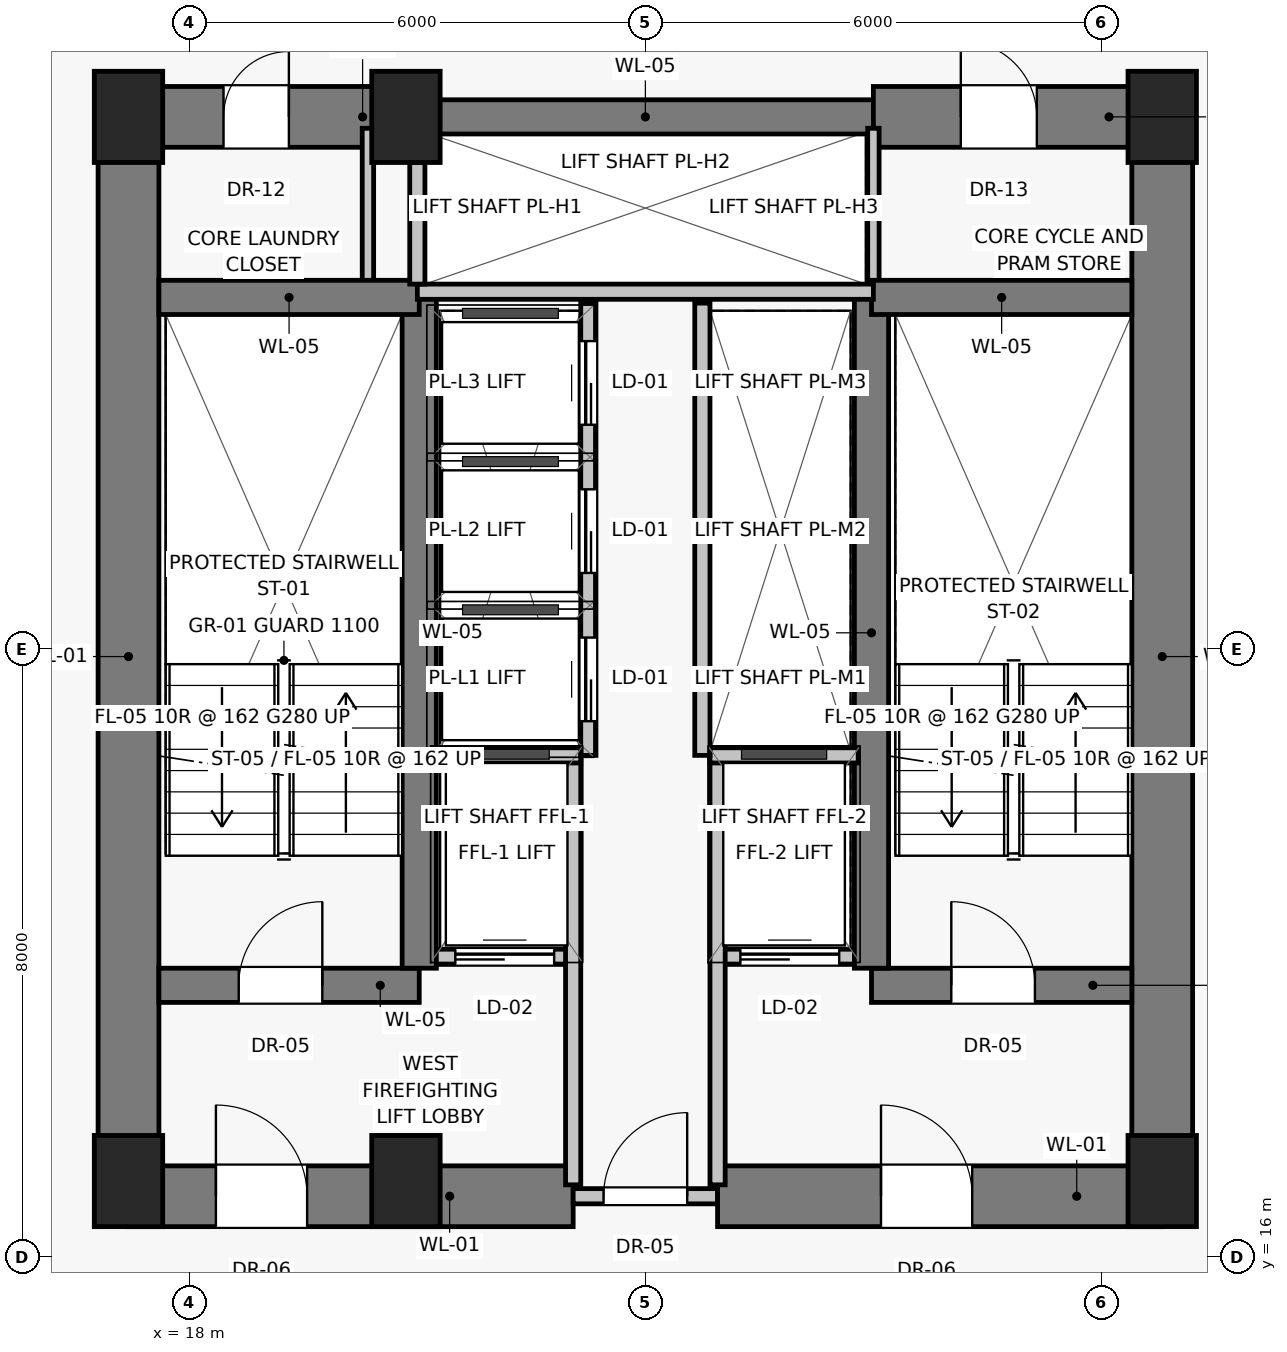
"""IFC4 building model, lengths in metres.
Left out: names, types, materials, properties, quantities, classifications, styles, units other than length and angle.
Written with IfcOpenShell. Run it as: python <this file> out.ifc"""

import sys

from ifc_helpers import new_model, si_unit, direction, frame, frame_2d, origin, origin_2d, place, context, subcontext, project, spatial, rectangle, extrude, source, transform, mapped, element, fill, save


model = new_model("IFC4")
c1 = context("Model", 3, precision=1e-05, world=origin(), true_north=direction((0.0, 1.0)))
c2 = subcontext(c1, "Body", "Model", "MODEL_VIEW")
j1 = project(units=[si_unit("LENGTHUNIT", "METRE"), si_unit("PLANEANGLEUNIT", "RADIAN")], contexts=[c1])
p1 = place(None, origin())
s1 = spatial("IfcSite", under=j1, at=p1, CompositionType="ELEMENT")
p2 = place(p1, origin())
s2 = spatial("IfcBuilding", under=s1, at=p2, CompositionType="ELEMENT")
p3 = place(p2, frame((0.0, 0.0, 73.85)))
s3 = spatial("IfcBuildingStorey", under=s2, at=p3, CompositionType="ELEMENT", Elevation=73.85)
for number, where, z_axis, x_axis in (
    (1, (17.2, 17.0, 0.0), (0.0, 0.0, 1.0), (1.0, 0.0, 0.0)),
    (2, (20.85, 17.0, 0.0), (0.0, 0.0, 1.0), (1.0, 0.0, 0.0)),
    (3, (30.8, 17.0, 0.0), (0.0, 0.0, 1.0), (1.0, 0.0, 0.0)),
    (4, (17.2, 31.0, 0.0), (0.0, 0.0, 1.0), (1.0, 0.0, 0.0)),
    (5, (20.85, 31.0, 0.0), (0.0, 0.0, 1.0), (1.0, 0.0, 0.0)),
    (6, (30.8, 31.0, 0.0), (0.0, 0.0, 1.0), (1.0, 0.0, 0.0)),
):
    element("IfcColumn", number, at=place(p3, frame(where, z_axis=z_axis, x_axis=x_axis)), inside=s3, PredefinedType="PILASTER", context=c2, shape_type="SweptSolid", body=[
        extrude(rectangle(XDim=0.9, YDim=1.2, at=origin_2d()), origin(), (0.0, 0.0, 1.0), 3.25),
    ])
for number, where, z_axis, x_axis in (
    (7, (17.2, 16.8, 0.0), (0.0, 0.0, 1.0), (0.0, 1.0, 0.0)),
    (8, (30.8, 16.8, 0.0), (0.0, 0.0, 1.0), (0.0, 1.0, 0.0)),
):
    element("IfcWall", number, at=place(p3, frame(where, z_axis=z_axis, x_axis=x_axis)), inside=s3, PredefinedType="SHEAR", context=c2, shape_type="SweptSolid", body=[
        extrude(rectangle(XDim=14.2, YDim=0.8, at=frame_2d((7.1, 0.0))), origin(), (0.0, 0.0, 1.0), 3.0),
    ])
p4 = place(p3, frame((17.2, 16.8, 0.0), z_axis=(0.0, 0.0, 1.0), x_axis=(1.0, 0.0, 0.0)))
e9 = element("IfcWall", 9, at=p4, inside=s3, PredefinedType="SHEAR", context=c2, shape_type="SweptSolid", body=[
    extrude(rectangle(XDim=5.85, YDim=0.8, at=frame_2d((2.925, 0.0))), origin(), (0.0, 0.0, 1.0), 3.0),
])
p5 = place(p4, frame((1.15, 0.0, 0.0)))
e10 = element("IfcOpeningElement", 10, at=p5, cuts=e9, PredefinedType="OPENING", context=c2, shape_type="SweptSolid", body=[
    extrude(rectangle(XDim=1.2, YDim=2.03, at=frame_2d((0.6, 1.015))), frame((0.0, 0.41, 0.0), z_axis=(0.0, -1.0, 0.0), x_axis=(1.0, 0.0, 0.0)), (0.0, 0.0, 1.0), 0.82),
])
p6 = place(p3, frame((23.05, 16.8, 0.0), z_axis=(0.0, 0.0, 1.0), x_axis=(1.0, 0.0, 0.0)))
e11 = element("IfcWall", 11, at=p6, inside=s3, PredefinedType="SOLIDWALL", context=c2, shape_type="SweptSolid", body=[
    extrude(rectangle(XDim=1.9, YDim=0.2, at=frame_2d((0.95, 0.0))), origin(), (0.0, 0.0, 1.0), 2.15),
])
p7 = place(p6, frame((0.4, 0.0, 0.0)))
e12 = element("IfcOpeningElement", 12, at=p7, cuts=e11, PredefinedType="OPENING", context=c2, shape_type="SweptSolid", body=[
    extrude(rectangle(XDim=1.1, YDim=2.03, at=frame_2d((0.55, 1.015))), frame((0.0, 0.11, 0.0), z_axis=(0.0, -1.0, 0.0), x_axis=(1.0, 0.0, 0.0)), (0.0, 0.0, 1.0), 0.22),
])
p8 = place(p3, frame((24.95, 16.8, 0.0), z_axis=(0.0, 0.0, 1.0), x_axis=(1.0, 0.0, 0.0)))
e13 = element("IfcWall", 13, at=p8, inside=s3, PredefinedType="SHEAR", context=c2, shape_type="SweptSolid", body=[
    extrude(rectangle(XDim=5.85, YDim=0.8, at=frame_2d((2.925, 0.0))), origin(), (0.0, 0.0, 1.0), 3.0),
])
p9 = place(p8, frame((2.15, 0.0, 0.0)))
e14 = element("IfcOpeningElement", 14, at=p9, cuts=e13, PredefinedType="OPENING", context=c2, shape_type="SweptSolid", body=[
    extrude(rectangle(XDim=1.2, YDim=2.03, at=frame_2d((0.6, 1.015))), frame((0.0, 0.41, 0.0), z_axis=(0.0, -1.0, 0.0), x_axis=(1.0, 0.0, 0.0)), (0.0, 0.0, 1.0), 0.82),
])
p10 = place(p3, frame((17.2, 31.0, 0.0), z_axis=(0.0, 0.0, 1.0), x_axis=(1.0, 0.0, 0.0)))
e15 = element("IfcWall", 15, at=p10, inside=s3, PredefinedType="SHEAR", context=c2, shape_type="SweptSolid", body=[
    extrude(rectangle(XDim=3.8, YDim=0.8, at=frame_2d((1.9, 0.0))), origin(), (0.0, 0.0, 1.0), 3.0),
])
p11 = place(p10, frame((1.25, 0.0, 0.0)))
e16 = element("IfcOpeningElement", 16, at=p11, cuts=e15, PredefinedType="OPENING", context=c2, shape_type="SweptSolid", body=[
    extrude(rectangle(XDim=0.86, YDim=2.01, at=frame_2d((0.43, 1.005))), frame((0.0, 0.41, 0.0), z_axis=(0.0, -1.0, 0.0), x_axis=(1.0, 0.0, 0.0)), (0.0, 0.0, 1.0), 0.82),
])
p12 = place(p3, frame((21.0, 31.0, 0.0), z_axis=(0.0, 0.0, 1.0), x_axis=(1.0, 0.0, 0.0)))
e17 = element("IfcWall", 17, at=p12, inside=s3, PredefinedType="SHEAR", context=c2, shape_type="SweptSolid", body=[
    extrude(rectangle(XDim=6.0, YDim=0.45, at=frame_2d((3.0, 0.0))), origin(), (0.0, 0.0, 1.0), 3.0),
])
p13 = place(p3, frame((27.0, 31.0, 0.0), z_axis=(0.0, 0.0, 1.0), x_axis=(1.0, 0.0, 0.0)))
e18 = element("IfcWall", 18, at=p13, inside=s3, PredefinedType="SHEAR", context=c2, shape_type="SweptSolid", body=[
    extrude(rectangle(XDim=3.8, YDim=0.8, at=frame_2d((1.9, 0.0))), origin(), (0.0, 0.0, 1.0), 3.0),
])
p14 = place(p13, frame((1.15, 0.0, 0.0)))
e19 = element("IfcOpeningElement", 19, at=p14, cuts=e18, PredefinedType="OPENING", context=c2, shape_type="SweptSolid", body=[
    extrude(rectangle(XDim=1.0, YDim=2.01, at=frame_2d((0.5, 1.005))), frame((0.0, 0.41, 0.0), z_axis=(0.0, -1.0, 0.0), x_axis=(1.0, 0.0, 0.0)), (0.0, 0.0, 1.0), 0.82),
])
for number, where, z_axis, x_axis in (
    (20, (20.35, 28.65, 0.0), (0.0, 0.0, 1.0), (0.0, 1.0, 0.0)),
    (21, (27.0, 28.65, 0.0), (0.0, 0.0, 1.0), (0.0, 1.0, 0.0)),
):
    element("IfcWall", number, at=place(p3, frame(where, z_axis=z_axis, x_axis=x_axis)), inside=s3, PredefinedType="PARTITIONING", context=c2, shape_type="SweptSolid", body=[
        extrude(rectangle(XDim=2.2, YDim=0.15, at=frame_2d((1.1, 0.0))), origin(), (0.0, 0.0, 1.0), 3.0),
    ])
p15 = place(p3, frame((17.6, 19.575, 0.0), z_axis=(0.0, 0.0, 1.0), x_axis=(1.0, 0.0, 0.0)))
e22 = element("IfcWall", 22, at=p15, inside=s3, PredefinedType="SHEAR", context=c2, shape_type="SweptSolid", body=[
    extrude(rectangle(XDim=3.425, YDim=0.45, at=frame_2d((1.712, 0.0))), origin(), (0.0, 0.0, 1.0), 3.0),
])
p16 = place(p15, frame((1.05, 0.0, 0.0)))
e23 = element("IfcOpeningElement", 23, at=p16, cuts=e22, PredefinedType="OPENING", context=c2, shape_type="SweptSolid", body=[
    extrude(rectangle(XDim=1.1, YDim=2.03, at=frame_2d((0.55, 1.015))), frame((0.0, 0.235, 0.0), z_axis=(0.0, -1.0, 0.0), x_axis=(1.0, 0.0, 0.0)), (0.0, 0.0, 1.0), 0.47),
])
p17 = place(p3, frame((21.2, 19.95, 0.0), z_axis=(0.0, 0.0, 1.0), x_axis=(1.0, 0.0, 0.0)))
e24 = element("IfcWall", 24, at=p17, inside=s3, PredefinedType="SOLIDWALL", context=c2, shape_type="SweptSolid", body=[
    extrude(rectangle(XDim=1.85, YDim=0.2, at=frame_2d((0.925, 0.0))), origin(), (0.0, 0.0, 1.0), 3.0),
])
p18 = place(p17, frame((0.3, 0.0, 0.0)))
e25 = element("IfcOpeningElement", 25, at=p18, cuts=e24, PredefinedType="OPENING", context=c2, shape_type="SweptSolid", body=[
    extrude(rectangle(XDim=1.3, YDim=2.25, at=frame_2d((0.65, 1.125))), frame((0.0, 0.11, 0.0), z_axis=(0.0, -1.0, 0.0), x_axis=(1.0, 0.0, 0.0)), (0.0, 0.0, 1.0), 0.22),
])
p19 = place(p3, frame((24.95, 19.95, 0.0), z_axis=(0.0, 0.0, 1.0), x_axis=(1.0, 0.0, 0.0)))
e26 = element("IfcWall", 26, at=p19, inside=s3, PredefinedType="SOLIDWALL", context=c2, shape_type="SweptSolid", body=[
    extrude(rectangle(XDim=1.85, YDim=0.2, at=frame_2d((0.925, 0.0))), origin(), (0.0, 0.0, 1.0), 3.0),
])
p20 = place(p19, frame((0.3, 0.0, 0.0)))
e27 = element("IfcOpeningElement", 27, at=p20, cuts=e26, PredefinedType="OPENING", context=c2, shape_type="SweptSolid", body=[
    extrude(rectangle(XDim=1.3, YDim=2.25, at=frame_2d((0.65, 1.125))), frame((0.0, 0.11, 0.0), z_axis=(0.0, -1.0, 0.0), x_axis=(1.0, 0.0, 0.0)), (0.0, 0.0, 1.0), 0.22),
])
p21 = place(p3, frame((26.975, 19.575, 0.0), z_axis=(0.0, 0.0, 1.0), x_axis=(1.0, 0.0, 0.0)))
e28 = element("IfcWall", 28, at=p21, inside=s3, PredefinedType="SHEAR", context=c2, shape_type="SweptSolid", body=[
    extrude(rectangle(XDim=3.425, YDim=0.45, at=frame_2d((1.712, 0.0))), origin(), (0.0, 0.0, 1.0), 3.0),
])
p22 = place(p21, frame((1.05, 0.0, 0.0)))
e29 = element("IfcOpeningElement", 29, at=p22, cuts=e28, PredefinedType="OPENING", context=c2, shape_type="SweptSolid", body=[
    extrude(rectangle(XDim=1.1, YDim=2.03, at=frame_2d((0.55, 1.015))), frame((0.0, 0.235, 0.0), z_axis=(0.0, -1.0, 0.0), x_axis=(1.0, 0.0, 0.0)), (0.0, 0.0, 1.0), 0.47),
])
for number, where, z_axis, x_axis in (
    (30, (21.025, 19.8, 0.0), (0.0, 0.0, 1.0), (0.0, 1.0, 0.0)),
    (31, (26.975, 19.8, 0.0), (0.0, 0.0, 1.0), (0.0, 1.0, 0.0)),
):
    element("IfcWall", number, at=place(p3, frame(where, z_axis=z_axis, x_axis=x_axis)), inside=s3, PredefinedType="SHEAR", context=c2, shape_type="SweptSolid", body=[
        extrude(rectangle(XDim=8.825, YDim=0.45, at=frame_2d((4.413, 0.0))), origin(), (0.0, 0.0, 1.0), 3.0),
    ])
for number, where, z_axis, x_axis in (
    (32, (17.6, 28.625, 0.0), (0.0, 0.0, 1.0), (1.0, 0.0, 0.0)),
    (33, (26.975, 28.625, 0.0), (0.0, 0.0, 1.0), (1.0, 0.0, 0.0)),
):
    element("IfcWall", number, at=place(p3, frame(where, z_axis=z_axis, x_axis=x_axis)), inside=s3, PredefinedType="SHEAR", context=c2, shape_type="SweptSolid", body=[
        extrude(rectangle(XDim=3.425, YDim=0.45, at=frame_2d((1.712, 0.0))), origin(), (0.0, 0.0, 1.0), 3.0),
    ])
for number, where, z_axis, x_axis in (
    (34, (23.05, 16.95, 0.0), (0.0, 0.0, 1.0), (0.0, 1.0, 0.0)),
    (35, (24.95, 16.95, 0.0), (0.0, 0.0, 1.0), (0.0, 1.0, 0.0)),
):
    element("IfcWall", number, at=place(p3, frame(where, z_axis=z_axis, x_axis=x_axis)), inside=s3, PredefinedType="SOLIDWALL", context=c2, shape_type="SweptSolid", body=[
        extrude(rectangle(XDim=5.6, YDim=0.2, at=frame_2d((2.8, 0.0))), origin(), (0.0, 0.0, 1.0), 3.0),
    ])
for number, where, z_axis, x_axis in (
    (36, (21.2, 22.6, 0.0), (0.0, 0.0, 1.0), (1.0, 0.0, 0.0)),
    (37, (24.85, 22.6, 0.0), (0.0, 0.0, 1.0), (1.0, 0.0, 0.0)),
):
    element("IfcWall", number, at=place(p3, frame(where, z_axis=z_axis, x_axis=x_axis)), inside=s3, PredefinedType="SOLIDWALL", context=c2, shape_type="SweptSolid", body=[
        extrude(rectangle(XDim=1.95, YDim=0.2, at=frame_2d((0.975, 0.0))), origin(), (0.0, 0.0, 1.0), 3.0),
    ])
p23 = place(p3, frame((21.0, 28.7, 0.0), z_axis=(0.0, 0.0, 1.0), x_axis=(1.0, 0.0, 0.0)))
e38 = element("IfcWall", 38, at=p23, inside=s3, PredefinedType="SOLIDWALL", context=c2, shape_type="SweptSolid", body=[
    extrude(rectangle(XDim=6.0, YDim=0.2, at=frame_2d((3.0, 0.0))), origin(), (0.0, 0.0, 1.0), 3.0),
])
p24 = place(p3, frame((21.0, 28.8, 0.0), z_axis=(0.0, 0.0, 1.0), x_axis=(0.0, 1.0, 0.0)))
e39 = element("IfcWall", 39, at=p24, inside=s3, PredefinedType="SOLIDWALL", context=c2, shape_type="SweptSolid", body=[
    extrude(rectangle(XDim=1.6, YDim=0.2, at=frame_2d((0.8, 0.0))), origin(), (0.0, 0.0, 1.0), 3.0),
])
p25 = place(p3, frame((23.25, 22.6, 0.0), z_axis=(0.0, 0.0, 1.0), x_axis=(0.0, 1.0, 0.0)))
e40 = element("IfcWall", 40, at=p25, inside=s3, PredefinedType="SOLIDWALL", context=c2, shape_type="SweptSolid", body=[
    extrude(rectangle(XDim=5.95, YDim=0.2, at=frame_2d((2.975, 0.0))), origin(), (0.0, 0.0, 1.0), 3.0),
])
p26 = place(p25, frame((0.45, 0.0, 0.0)))
e41 = element("IfcOpeningElement", 41, at=p26, cuts=e40, PredefinedType="OPENING", context=c2, shape_type="SweptSolid", body=[
    extrude(rectangle(XDim=1.1, YDim=2.08, at=frame_2d((0.55, 1.04))), frame((0.0, 0.11, 0.0), z_axis=(0.0, -1.0, 0.0), x_axis=(1.0, 0.0, 0.0)), (0.0, 0.0, 1.0), 0.22),
])
p27 = place(p25, frame((2.4, 0.0, 0.0)))
e42 = element("IfcOpeningElement", 42, at=p27, cuts=e40, PredefinedType="OPENING", context=c2, shape_type="SweptSolid", body=[
    extrude(rectangle(XDim=1.1, YDim=2.08, at=frame_2d((0.55, 1.04))), frame((0.0, 0.11, 0.0), z_axis=(0.0, -1.0, 0.0), x_axis=(1.0, 0.0, 0.0)), (0.0, 0.0, 1.0), 0.22),
])
p28 = place(p25, frame((4.35, 0.0, 0.0)))
e43 = element("IfcOpeningElement", 43, at=p28, cuts=e40, PredefinedType="OPENING", context=c2, shape_type="SweptSolid", body=[
    extrude(rectangle(XDim=1.1, YDim=2.08, at=frame_2d((0.55, 1.04))), frame((0.0, 0.11, 0.0), z_axis=(0.0, -1.0, 0.0), x_axis=(1.0, 0.0, 0.0)), (0.0, 0.0, 1.0), 0.22),
])
p29 = place(p3, frame((24.75, 22.6, 0.0), z_axis=(0.0, 0.0, 1.0), x_axis=(0.0, 1.0, 0.0)))
e44 = element("IfcWall", 44, at=p29, inside=s3, PredefinedType="SOLIDWALL", context=c2, shape_type="SweptSolid", body=[
    extrude(rectangle(XDim=5.95, YDim=0.2, at=frame_2d((2.975, 0.0))), origin(), (0.0, 0.0, 1.0), 3.0),
])
m1 = source(origin(), c2, "Body", "SweptSolid", [
    extrude(rectangle(XDim=1.2, YDim=2.03, at=frame_2d((0.6, 1.015))), frame((0.0, 0.025, 0.0), z_axis=(0.0, -1.0, 0.0), x_axis=(1.0, 0.0, 0.0)), (0.0, 0.0, 1.0), 0.05),
])
p30 = place(p5, origin())
e45 = element("IfcDoor", 45, at=p30, inside=s3, OperationType="SINGLE_SWING_LEFT", PredefinedType="DOOR", context=c2, shape_type="MappedRepresentation", body=[
    mapped(m1, transform((0.0, 0.0, 0.0), scale=1.0)),
])
fill(e10, e45)
m2 = source(origin(), c2, "Body", "SweptSolid", [
    extrude(rectangle(XDim=1.1, YDim=2.03, at=frame_2d((0.55, 1.015))), frame((0.0, 0.025, 0.0), z_axis=(0.0, -1.0, 0.0), x_axis=(1.0, 0.0, 0.0)), (0.0, 0.0, 1.0), 0.05),
])
p31 = place(p7, origin())
e46 = element("IfcDoor", 46, at=p31, inside=s3, OperationType="SINGLE_SWING_RIGHT", PredefinedType="DOOR", context=c2, shape_type="MappedRepresentation", body=[
    mapped(m2, transform((0.0, 0.0, 0.0), scale=1.0)),
])
fill(e12, e46)
p32 = place(p9, origin())
e47 = element("IfcDoor", 47, at=p32, inside=s3, OperationType="SINGLE_SWING_LEFT", PredefinedType="DOOR", context=c2, shape_type="MappedRepresentation", body=[
    mapped(m1, transform((0.0, 0.0, 0.0), scale=1.0)),
])
fill(e14, e47)
m3 = source(origin(), c2, "Body", "SweptSolid", [
    extrude(rectangle(XDim=0.86, YDim=2.01, at=frame_2d((0.43, 1.005))), frame((0.0, 0.025, 0.0), z_axis=(0.0, -1.0, 0.0), x_axis=(1.0, 0.0, 0.0)), (0.0, 0.0, 1.0), 0.05),
])
p33 = place(p11, origin())
e48 = element("IfcDoor", 48, at=p33, inside=s3, OperationType="SINGLE_SWING_RIGHT", PredefinedType="DOOR", context=c2, shape_type="MappedRepresentation", body=[
    mapped(m3, transform((0.0, 0.0, 0.0), scale=1.0)),
])
fill(e16, e48)
m4 = source(origin(), c2, "Body", "SweptSolid", [
    extrude(rectangle(XDim=1.0, YDim=2.01, at=frame_2d((0.5, 1.005))), frame((0.0, 0.025, 0.0), z_axis=(0.0, -1.0, 0.0), x_axis=(1.0, 0.0, 0.0)), (0.0, 0.0, 1.0), 0.05),
])
p34 = place(p14, origin())
e49 = element("IfcDoor", 49, at=p34, inside=s3, OperationType="SINGLE_SWING_LEFT", PredefinedType="DOOR", context=c2, shape_type="MappedRepresentation", body=[
    mapped(m4, transform((0.0, 0.0, 0.0), scale=1.0)),
])
fill(e19, e49)
p35 = place(p16, origin())
e50 = element("IfcDoor", 50, at=p35, inside=s3, OperationType="SINGLE_SWING_RIGHT", PredefinedType="DOOR", context=c2, shape_type="MappedRepresentation", body=[
    mapped(m2, transform((0.0, 0.0, 0.0), scale=1.0)),
])
fill(e23, e50)
m5 = source(origin(), c2, "Body", "SweptSolid", [
    extrude(rectangle(XDim=1.3, YDim=2.25, at=frame_2d((0.65, 1.125))), frame((0.0, 0.025, 0.0), z_axis=(0.0, -1.0, 0.0), x_axis=(1.0, 0.0, 0.0)), (0.0, 0.0, 1.0), 0.05),
])
p36 = place(p18, origin())
e51 = element("IfcDoor", 51, at=p36, inside=s3, OperationType="SLIDING_TO_LEFT", PredefinedType="DOOR", context=c2, shape_type="MappedRepresentation", body=[
    mapped(m5, transform((0.0, 0.0, 0.0), scale=1.0)),
])
fill(e25, e51)
p37 = place(p20, origin())
e52 = element("IfcDoor", 52, at=p37, inside=s3, OperationType="SLIDING_TO_LEFT", PredefinedType="DOOR", context=c2, shape_type="MappedRepresentation", body=[
    mapped(m5, transform((0.0, 0.0, 0.0), scale=1.0)),
])
fill(e27, e52)
p38 = place(p22, origin())
e53 = element("IfcDoor", 53, at=p38, inside=s3, OperationType="SINGLE_SWING_LEFT", PredefinedType="DOOR", context=c2, shape_type="MappedRepresentation", body=[
    mapped(m2, transform((0.0, 0.0, 0.0), scale=1.0)),
])
fill(e29, e53)
m6 = source(origin(), c2, "Body", "SweptSolid", [
    extrude(rectangle(XDim=1.1, YDim=2.08, at=frame_2d((0.55, 1.04))), frame((0.0, 0.025, 0.0), z_axis=(0.0, -1.0, 0.0), x_axis=(1.0, 0.0, 0.0)), (0.0, 0.0, 1.0), 0.05),
])
p39 = place(p26, origin())
e54 = element("IfcDoor", 54, at=p39, inside=s3, OperationType="SLIDING_TO_LEFT", PredefinedType="DOOR", context=c2, shape_type="MappedRepresentation", body=[
    mapped(m6, transform((0.0, 0.0, 0.0), scale=1.0)),
])
fill(e41, e54)
p40 = place(p27, origin())
e55 = element("IfcDoor", 55, at=p40, inside=s3, OperationType="SLIDING_TO_LEFT", PredefinedType="DOOR", context=c2, shape_type="MappedRepresentation", body=[
    mapped(m6, transform((0.0, 0.0, 0.0), scale=1.0)),
])
fill(e42, e55)
p41 = place(p28, origin())
e56 = element("IfcDoor", 56, at=p41, inside=s3, OperationType="SLIDING_TO_LEFT", PredefinedType="DOOR", context=c2, shape_type="MappedRepresentation", body=[
    mapped(m6, transform((0.0, 0.0, 0.0), scale=1.0)),
])
fill(e43, e56)
save(model, sys.argv[1])
